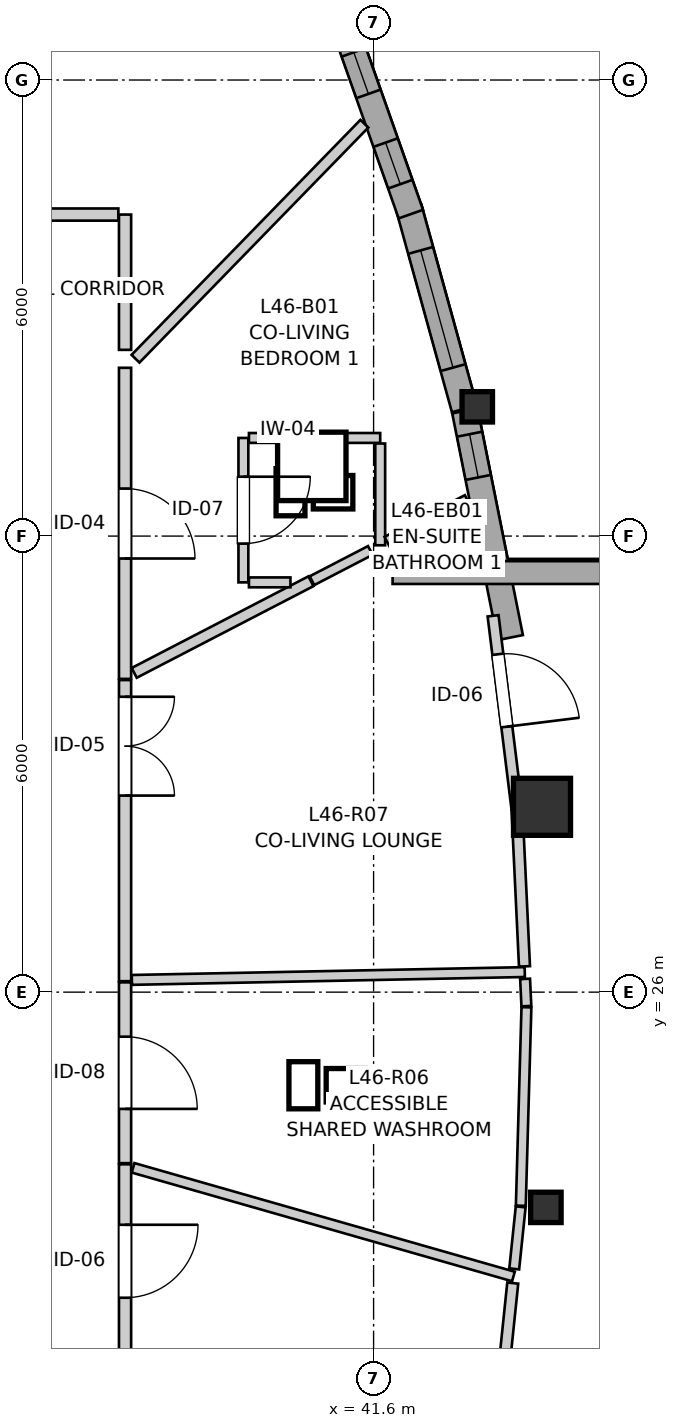
"""IFC4 building model, lengths in metres.
Left out: names, types, materials, properties, quantities, classifications, styles, units other than length and angle.
Written with IfcOpenShell. Run it as: python <this file> out.ifc"""

import sys

from ifc_helpers import new_model, si_unit, direction, frame, frame_2d, origin, origin_2d, place, context, subcontext, project, spatial, rectangle, i_section, extrude, source, transform, mapped, element, fill, save


model = new_model("IFC4")
c1 = context("Model", 3, precision=1e-05, world=origin(), true_north=direction((0.0, 1.0)))
c2 = subcontext(c1, "Body", "Model", "MODEL_VIEW")
j1 = project(units=[si_unit("LENGTHUNIT", "METRE"), si_unit("PLANEANGLEUNIT", "RADIAN")], contexts=[c1])
p1 = place(None, origin())
s1 = spatial("IfcSite", under=j1, at=p1, CompositionType="ELEMENT")
p2 = place(p1, origin())
s2 = spatial("IfcBuilding", under=s1, at=p2, CompositionType="ELEMENT")
p3 = place(p2, frame((0.0, 0.0, 155.4)))
s3 = spatial("IfcBuildingStorey", under=s2, at=p3, CompositionType="ELEMENT", Elevation=155.4)
m1 = source(origin(), c2, "Body", "SweptSolid", [
    extrude(i_section(OverallWidth=0.401, OverallDepth=0.399, WebThickness=0.023, FlangeThickness=0.036, FilletRadius=0.015, at=origin_2d()), origin(), (0.0, 0.0, 1.0), 2.935),
])
p4 = place(p3, frame((43.867, 23.168, 0.0), z_axis=(0.0, 0.0, 1.0), x_axis=(1.0, 0.0, 0.0)))
e1 = element("IfcColumn", 1, at=p4, inside=s3, PredefinedType="PILASTER", context=c2, shape_type="MappedRepresentation", body=[
    mapped(m1, transform((0.0, 0.0, 0.0), x_axis=(1.0, 0.0, 0.0), y_axis=(0.0, 1.0, 0.0), z_axis=(0.0, 0.0, 1.0), scale=1.0)),
])
m2 = source(origin(), c2, "Body", "SweptSolid", [
    extrude(rectangle(XDim=0.75, YDim=0.75, at=origin_2d()), origin(), (0.0, 0.0, 1.0), 2.935),
])
p5 = place(p3, frame((43.816, 28.438, 0.0), z_axis=(0.0, 0.0, 1.0), x_axis=(1.0, 0.0, 0.0)))
e2 = element("IfcColumn", 2, at=p5, inside=s3, PredefinedType="COLUMN", context=c2, shape_type="MappedRepresentation", body=[
    mapped(m2, transform((0.0, 0.0, 0.0), x_axis=(1.0, 0.0, 0.0), y_axis=(0.0, 1.0, 0.0), z_axis=(0.0, 0.0, 1.0), scale=1.0)),
])
p6 = place(p3, frame((42.964, 33.7, 0.0), z_axis=(0.0, 0.0, 1.0), x_axis=(1.0, 0.0, 0.0)))
e3 = element("IfcColumn", 3, at=p6, inside=s3, PredefinedType="PILASTER", context=c2, shape_type="MappedRepresentation", body=[
    mapped(m1, transform((0.0, 0.0, 0.0), x_axis=(1.0, 0.0, 0.0), y_axis=(0.0, 1.0, 0.0), z_axis=(0.0, 0.0, 1.0), scale=1.0)),
])
p7 = place(p3, frame((43.398, 30.664, 0.0), z_axis=(0.0, 0.0, 1.0), x_axis=(-0.196147002944, 0.980574501624, 0.0)))
e4 = element("IfcWall", 4, at=p7, inside=s3, PredefinedType="SOLIDWALL", context=c2, shape_type="SweptSolid", body=[
    extrude(rectangle(XDim=3.042, YDim=0.34, at=frame_2d((1.521, 0.0))), origin(), (0.0, 0.0, 1.0), 2.515),
])
p8 = place(p7, frame((2.149, 0.0, 0.82)))
e5 = element("IfcOpeningElement", 5, at=p8, cuts=e4, PredefinedType="OPENING", context=c2, shape_type="SweptSolid", body=[
    extrude(rectangle(XDim=0.58, YDim=1.35, at=frame_2d((0.29, 0.675))), frame((0.0, 0.18, 0.0), z_axis=(0.0, -1.0, 0.0), x_axis=(1.0, 0.0, 0.0)), (0.0, 0.0, 1.0), 0.36),
])
p9 = place(p3, frame((42.795, 33.674, 0.0), z_axis=(0.0, 0.0, 1.0), x_axis=(-0.266404970566, 0.963861188999, 0.0)))
e6 = element("IfcWall", 6, at=p9, inside=s3, PredefinedType="SOLIDWALL", context=c2, shape_type="SweptSolid", body=[
    extrude(rectangle(XDim=2.745, YDim=0.34, at=frame_2d((1.372, 0.0))), origin(), (0.0, 0.0, 1.0), 2.515),
])
p10 = place(p9, frame((0.562, 0.0, 0.82)))
e7 = element("IfcOpeningElement", 7, at=p10, cuts=e6, PredefinedType="OPENING", context=c2, shape_type="SweptSolid", body=[
    extrude(rectangle(XDim=1.6, YDim=1.35, at=frame_2d((0.8, 0.675))), frame((0.0, 0.18, 0.0), z_axis=(0.0, -1.0, 0.0), x_axis=(1.0, 0.0, 0.0)), (0.0, 0.0, 1.0), 0.36),
])
p11 = place(p3, frame((42.09, 36.236, 0.0), z_axis=(0.0, 0.0, 1.0), x_axis=(-0.332705243691, 0.943030869495, 0.0)))
e8 = element("IfcWall", 8, at=p11, inside=s3, PredefinedType="SOLIDWALL", context=c2, shape_type="SweptSolid", body=[
    extrude(rectangle(XDim=2.668, YDim=0.34, at=frame_2d((1.334, 0.0))), origin(), (0.0, 0.0, 1.0), 2.515),
])
p12 = place(p11, frame((0.417, 0.0, 0.82)))
e9 = element("IfcOpeningElement", 9, at=p12, cuts=e8, PredefinedType="OPENING", context=c2, shape_type="SweptSolid", body=[
    extrude(rectangle(XDim=0.58, YDim=1.35, at=frame_2d((0.29, 0.675))), frame((0.0, 0.18, 0.0), z_axis=(0.0, -1.0, 0.0), x_axis=(1.0, 0.0, 0.0)), (0.0, 0.0, 1.0), 0.36),
])
p13 = place(p11, frame((1.677, 0.0, 0.82)))
e10 = element("IfcOpeningElement", 10, at=p13, cuts=e8, PredefinedType="OPENING", context=c2, shape_type="SweptSolid", body=[
    extrude(rectangle(XDim=0.58, YDim=1.35, at=frame_2d((0.29, 0.675))), frame((0.0, 0.18, 0.0), z_axis=(0.0, -1.0, 0.0), x_axis=(1.0, 0.0, 0.0)), (0.0, 0.0, 1.0), 0.36),
])
p14 = place(p3, frame((41.85, 31.52, 0.0), z_axis=(0.0, 0.0, 1.0), x_axis=(1.0, 0.0, 0.0)))
e11 = element("IfcWall", 11, at=p14, inside=s3, PredefinedType="SOLIDWALL", context=c2, shape_type="SweptSolid", body=[
    extrude(rectangle(XDim=17.423, YDim=0.3, at=frame_2d((8.711, 0.0))), origin(), (0.0, 0.0, 1.0), 2.115),
])
p15 = place(p3, frame((38.33, 34.214, 0.0), z_axis=(0.0, 0.0, 1.0), x_axis=(0.0, -1.0, 0.0)))
e12 = element("IfcWall", 12, at=p15, inside=s3, PredefinedType="PARTITIONING", context=c2, shape_type="SweptSolid", body=[
    extrude(rectangle(XDim=4.093, YDim=0.16, at=frame_2d((2.046, 0.0))), origin(), (0.0, 0.0, 1.0), 2.935),
])
p16 = place(p15, frame((1.589, 0.0, 0.0)))
e13 = element("IfcOpeningElement", 13, at=p16, cuts=e12, PredefinedType="OPENING", context=c2, shape_type="SweptSolid", body=[
    extrude(rectangle(XDim=0.92, YDim=2.1, at=frame_2d((0.46, 1.05))), frame((0.0, 0.09, 0.0), z_axis=(0.0, -1.0, 0.0), x_axis=(1.0, 0.0, 0.0)), (0.0, 0.0, 1.0), 0.18),
])
p17 = place(p3, frame((38.33, 30.106, 0.0), z_axis=(0.0, 0.0, 1.0), x_axis=(0.0, -1.0, 0.0)))
e14 = element("IfcWall", 14, at=p17, inside=s3, PredefinedType="PARTITIONING", context=c2, shape_type="SweptSolid", body=[
    extrude(rectangle(XDim=3.962, YDim=0.16, at=frame_2d((1.981, 0.0))), origin(), (0.0, 0.0, 1.0), 2.935),
])
p18 = place(p17, frame((0.22, 0.0, 0.0)))
e15 = element("IfcOpeningElement", 15, at=p18, cuts=e14, PredefinedType="OPENING", context=c2, shape_type="SweptSolid", body=[
    extrude(rectangle(XDim=1.3, YDim=2.1, at=frame_2d((0.65, 1.05))), frame((0.0, 0.09, 0.0), z_axis=(0.0, -1.0, 0.0), x_axis=(1.0, 0.0, 0.0)), (0.0, 0.0, 1.0), 0.18),
])
p19 = place(p3, frame((43.172, 30.951, 0.0), z_axis=(0.0, 0.0, 1.0), x_axis=(0.122990311665, -0.99240787141, 0.0)))
e16 = element("IfcWall", 16, at=p19, inside=s3, PredefinedType="PARTITIONING", context=c2, shape_type="SweptSolid", body=[
    extrude(rectangle(XDim=2.561, YDim=0.145, at=frame_2d((1.28, 0.0))), origin(), (0.0, 0.0, 1.0), 2.503),
])
p20 = place(p19, frame((0.51, 0.0, 0.0)))
e17 = element("IfcOpeningElement", 17, at=p20, cuts=e16, PredefinedType="OPENING", context=c2, shape_type="SweptSolid", body=[
    extrude(rectangle(XDim=0.96, YDim=2.1, at=frame_2d((0.48, 1.05))), frame((0.0, 0.083, 0.0), z_axis=(0.0, -1.0, 0.0), x_axis=(1.0, 0.0, 0.0)), (0.0, 0.0, 1.0), 0.165),
])
p21 = place(p3, frame((38.33, 23.735, 0.0), z_axis=(0.0, 0.0, 1.0), x_axis=(0.0, -1.0, 0.0)))
e18 = element("IfcWall", 18, at=p21, inside=s3, PredefinedType="PARTITIONING", context=c2, shape_type="SweptSolid", body=[
    extrude(rectangle(XDim=2.535, YDim=0.16, at=frame_2d((1.268, 0.0))), origin(), (0.0, 0.0, 1.0), 2.935),
])
p22 = place(p21, frame((0.795, 0.0, 0.0)))
e19 = element("IfcOpeningElement", 19, at=p22, cuts=e18, PredefinedType="OPENING", context=c2, shape_type="SweptSolid", body=[
    extrude(rectangle(XDim=0.96, YDim=2.1, at=frame_2d((0.48, 1.05))), frame((0.0, 0.09, 0.0), z_axis=(0.0, -1.0, 0.0), x_axis=(1.0, 0.0, 0.0)), (0.0, 0.0, 1.0), 0.18),
])
p23 = place(p3, frame((38.33, 26.129, 0.0), z_axis=(0.0, 0.0, 1.0), x_axis=(0.0, -1.0, 0.0)))
e20 = element("IfcWall", 20, at=p23, inside=s3, PredefinedType="PARTITIONING", context=c2, shape_type="SweptSolid", body=[
    extrude(rectangle(XDim=2.379, YDim=0.16, at=frame_2d((1.189, 0.0))), origin(), (0.0, 0.0, 1.0), 2.935),
])
p24 = place(p23, frame((0.715, 0.0, 0.0)))
e21 = element("IfcOpeningElement", 21, at=p24, cuts=e20, PredefinedType="OPENING", context=c2, shape_type="SweptSolid", body=[
    extrude(rectangle(XDim=0.95, YDim=2.1, at=frame_2d((0.475, 1.05))), frame((0.0, 0.09, 0.0), z_axis=(0.0, -1.0, 0.0), x_axis=(1.0, 0.0, 0.0)), (0.0, 0.0, 1.0), 0.18),
])
p25 = place(p3, frame((39.887, 33.291, 0.0), z_axis=(0.0, 0.0, 1.0), x_axis=(0.0, -1.0, 0.0)))
e22 = element("IfcWall", 22, at=p25, inside=s3, PredefinedType="PARTITIONING", context=c2, shape_type="SweptSolid", body=[
    extrude(rectangle(XDim=1.9, YDim=0.13, at=frame_2d((0.95, 0.0))), origin(), (0.0, 0.0, 1.0), 2.935),
])
p26 = place(p25, frame((0.51, 0.0, 0.0)))
e23 = element("IfcOpeningElement", 23, at=p26, cuts=e22, PredefinedType="OPENING", context=c2, shape_type="SweptSolid", body=[
    extrude(rectangle(XDim=0.88, YDim=2.05, at=frame_2d((0.44, 1.025))), frame((0.0, 0.075, 0.0), z_axis=(0.0, -1.0, 0.0), x_axis=(1.0, 0.0, 0.0)), (0.0, 0.0, 1.0), 0.15),
])
p27 = place(p3, frame((38.436, 23.689, 0.0), z_axis=(0.0, 0.0, 1.0), x_axis=(0.961531027854, -0.274696345942, 0.0)))
e24 = element("IfcWall", 24, at=p27, inside=s3, PredefinedType="PARTITIONING", context=c2, shape_type="SweptSolid", body=[
    extrude(rectangle(XDim=5.205, YDim=0.13, at=frame_2d((2.602, 0.0))), origin(), (0.0, 0.0, 1.0), 2.935),
])
p28 = place(p3, frame((38.419, 26.161, 0.0), z_axis=(0.0, 0.0, 1.0), x_axis=(0.999801492135, 0.019924264719, 0.0)))
e25 = element("IfcWall", 25, at=p28, inside=s3, PredefinedType="PARTITIONING", context=c2, shape_type="SweptSolid", body=[
    extrude(rectangle(XDim=5.171, YDim=0.13, at=frame_2d((2.585, 0.0))), origin(), (0.0, 0.0, 1.0), 2.935),
])
p29 = place(p3, frame((38.468, 34.333, 0.0), z_axis=(0.0, 0.0, 1.0), x_axis=(0.697683159601, 0.71640645503, 0.0)))
e26 = element("IfcWall", 26, at=p29, inside=s3, PredefinedType="PARTITIONING", context=c2, shape_type="SweptSolid", body=[
    extrude(rectangle(XDim=4.316, YDim=0.145, at=frame_2d((2.158, 0.0))), origin(), (0.0, 0.0, 1.0), 2.935),
])
p30 = place(p3, frame((38.45, 30.2, 0.0), z_axis=(0.0, 0.0, 1.0), x_axis=(0.887788385545, 0.460251868537, 0.0)))
e27 = element("IfcWall", 27, at=p30, inside=s3, PredefinedType="PARTITIONING", context=c2, shape_type="SweptSolid", body=[
    extrude(rectangle(XDim=2.619, YDim=0.145, at=frame_2d((1.31, 0.0))), origin(), (0.0, 0.0, 1.0), 2.935),
])
p31 = place(p3, frame((43.537, 23.19, 0.0), z_axis=(0.0, 0.0, 1.0), x_axis=(0.028319632762, 0.999598918767, 0.0)))
e28 = element("IfcWall", 28, at=p31, inside=s3, PredefinedType="PARTITIONING", context=c2, shape_type="SweptSolid", body=[
    extrude(rectangle(XDim=2.612, YDim=0.13, at=frame_2d((1.306, 0.0))), origin(), (0.0, 0.0, 1.0), 2.503),
])
p32 = place(p3, frame((43.488, 28.395, 0.0), z_axis=(0.0, 0.0, 1.0), x_axis=(0.047441179451, -0.998874033346, 0.0)))
e29 = element("IfcWall", 29, at=p32, inside=s3, PredefinedType="PARTITIONING", context=c2, shape_type="SweptSolid", body=[
    extrude(rectangle(XDim=2.058, YDim=0.145, at=frame_2d((1.029, 0.0))), origin(), (0.0, 0.0, 1.0), 2.503),
])
p33 = place(p3, frame((39.96, 33.291, 0.0), z_axis=(0.0, 0.0, 1.0), x_axis=(1.0, 0.0, 0.0)))
e30 = element("IfcWall", 30, at=p33, inside=s3, PredefinedType="PARTITIONING", context=c2, shape_type="SweptSolid", body=[
    extrude(rectangle(XDim=1.727, YDim=0.13, at=frame_2d((0.864, 0.0))), origin(), (0.0, 0.0, 1.0), 2.935),
])
p34 = place(p3, frame((38.33, 34.45, 0.0), z_axis=(0.0, 0.0, 1.0), x_axis=(0.0, 1.0, 0.0)))
e31 = element("IfcWall", 31, at=p34, inside=s3, PredefinedType="PARTITIONING", context=c2, shape_type="SweptSolid", body=[
    extrude(rectangle(XDim=1.78, YDim=0.16, at=frame_2d((0.89, 0.0))), origin(), (0.0, 0.0, 1.0), 2.935),
])
p35 = place(p3, frame((36.565, 36.23, 0.0), z_axis=(0.0, 0.0, 1.0), x_axis=(1.0, 0.0, 0.0)))
e32 = element("IfcWall", 32, at=p35, inside=s3, PredefinedType="PARTITIONING", context=c2, shape_type="SweptSolid", body=[
    extrude(rectangle(XDim=1.677, YDim=0.16, at=frame_2d((0.838, 0.0))), origin(), (0.0, 0.0, 1.0), 2.935),
])
p36 = place(p3, frame((43.273, 20.646, 0.0), z_axis=(0.0, 0.0, 1.0), x_axis=(0.103045636414, 0.99467662927, 0.0)))
e33 = element("IfcWall", 33, at=p36, inside=s3, PredefinedType="PARTITIONING", context=c2, shape_type="SweptSolid", body=[
    extrude(rectangle(XDim=1.535, YDim=0.145, at=frame_2d((0.768, 0.0))), origin(), (0.0, 0.0, 1.0), 2.503),
])
p37 = place(p3, frame((41.687, 31.879, 0.0), z_axis=(0.0, 0.0, 1.0), x_axis=(0.0, 1.0, 0.0)))
e34 = element("IfcWall", 34, at=p37, inside=s3, PredefinedType="PARTITIONING", context=c2, shape_type="SweptSolid", body=[
    extrude(rectangle(XDim=1.339, YDim=0.13, at=frame_2d((0.669, 0.0))), origin(), (0.0, 0.0, 1.0), 2.935),
])
p38 = place(p3, frame((41.778, 31.926, 0.0), z_axis=(0.0, 0.0, 1.0), x_axis=(0.887683122967, 0.460454854681, 0.0)))
e35 = element("IfcWall", 35, at=p38, inside=s3, PredefinedType="PARTITIONING", context=c2, shape_type="SweptSolid", body=[
    extrude(rectangle(XDim=1.19, YDim=0.145, at=frame_2d((0.595, 0.0))), origin(), (0.0, 0.0, 1.0), 2.935),
])
p39 = place(p3, frame((40.789, 31.413, 0.0), z_axis=(0.0, 0.0, 1.0), x_axis=(0.887895541879, 0.460045113779, 0.0)))
e36 = element("IfcWall", 36, at=p39, inside=s3, PredefinedType="PARTITIONING", context=c2, shape_type="SweptSolid", body=[
    extrude(rectangle(XDim=0.865, YDim=0.13, at=frame_2d((0.432, 0.0))), origin(), (0.0, 0.0, 1.0), 2.935),
])
p40 = place(p3, frame((43.45, 22.359, 0.0), z_axis=(0.0, 0.0, 1.0), x_axis=(0.103538633142, 0.994625432737, 0.0)))
e37 = element("IfcWall", 37, at=p40, inside=s3, PredefinedType="PARTITIONING", context=c2, shape_type="SweptSolid", body=[
    extrude(rectangle(XDim=0.821, YDim=0.13, at=frame_2d((0.41, 0.0))), origin(), (0.0, 0.0, 1.0), 2.503),
])
p41 = place(p3, frame((39.96, 31.391, 0.0), z_axis=(0.0, 0.0, 1.0), x_axis=(1.0, 0.0, 0.0)))
e38 = element("IfcWall", 38, at=p41, inside=s3, PredefinedType="PARTITIONING", context=c2, shape_type="SweptSolid", body=[
    extrude(rectangle(XDim=0.546, YDim=0.13, at=frame_2d((0.273, 0.0))), origin(), (0.0, 0.0, 1.0), 2.103),
])
p42 = place(p3, frame((43.593, 26.174, 0.0), z_axis=(0.0, 0.0, 1.0), x_axis=(0.04762980516, -0.998865056782, 0.0)))
e39 = element("IfcWall", 39, at=p42, inside=s3, PredefinedType="PARTITIONING", context=c2, shape_type="SweptSolid", body=[
    extrude(rectangle(XDim=0.359, YDim=0.13, at=frame_2d((0.179, 0.0))), origin(), (0.0, 0.0, 1.0), 2.503),
])
m3 = source(origin(), c2, "Body", "SweptSolid", [
    extrude(rectangle(XDim=0.58, YDim=1.35, at=frame_2d((0.29, 0.675))), frame((0.0, 0.03, 0.0), z_axis=(0.0, -1.0, 0.0), x_axis=(1.0, 0.0, 0.0)), (0.0, 0.0, 1.0), 0.06),
])
p43 = place(p8, origin())
e40 = element("IfcWindow", 40, at=p43, inside=s3, PartitioningType="SINGLE_PANEL", PredefinedType="WINDOW", context=c2, shape_type="MappedRepresentation", body=[
    mapped(m3, transform((0.0, 0.0, 0.0), x_axis=(1.0, 0.0, 0.0), y_axis=(0.0, 1.0, 0.0), z_axis=(0.0, 0.0, 1.0), scale=1.0)),
])
fill(e5, e40)
m4 = source(origin(), c2, "Body", "SweptSolid", [
    extrude(rectangle(XDim=1.6, YDim=1.35, at=frame_2d((0.8, 0.675))), frame((0.0, 0.03, 0.0), z_axis=(0.0, -1.0, 0.0), x_axis=(1.0, 0.0, 0.0)), (0.0, 0.0, 1.0), 0.06),
])
p44 = place(p10, origin())
e41 = element("IfcWindow", 41, at=p44, inside=s3, PartitioningType="SINGLE_PANEL", PredefinedType="WINDOW", context=c2, shape_type="MappedRepresentation", body=[
    mapped(m4, transform((0.0, 0.0, 0.0), x_axis=(1.0, 0.0, 0.0), y_axis=(0.0, 1.0, 0.0), z_axis=(0.0, 0.0, 1.0), scale=1.0)),
])
fill(e7, e41)
p45 = place(p12, origin())
e42 = element("IfcWindow", 42, at=p45, inside=s3, PartitioningType="SINGLE_PANEL", PredefinedType="WINDOW", context=c2, shape_type="MappedRepresentation", body=[
    mapped(m3, transform((0.0, 0.0, 0.0), x_axis=(1.0, 0.0, 0.0), y_axis=(0.0, 1.0, 0.0), z_axis=(0.0, 0.0, 1.0), scale=1.0)),
])
fill(e9, e42)
p46 = place(p13, origin())
e43 = element("IfcWindow", 43, at=p46, inside=s3, PartitioningType="SINGLE_PANEL", PredefinedType="WINDOW", context=c2, shape_type="MappedRepresentation", body=[
    mapped(m3, transform((0.0, 0.0, 0.0), x_axis=(1.0, 0.0, 0.0), y_axis=(0.0, 1.0, 0.0), z_axis=(0.0, 0.0, 1.0), scale=1.0)),
])
fill(e10, e43)
m5 = source(origin(), c2, "Body", "SweptSolid", [
    extrude(rectangle(XDim=0.92, YDim=2.1, at=frame_2d((0.46, 1.05))), frame((0.0, 0.025, 0.0), z_axis=(0.0, -1.0, 0.0), x_axis=(1.0, 0.0, 0.0)), (0.0, 0.0, 1.0), 0.05),
])
p47 = place(p16, origin())
e44 = element("IfcDoor", 44, at=p47, inside=s3, OperationType="SINGLE_SWING_RIGHT", PredefinedType="DOOR", context=c2, shape_type="MappedRepresentation", body=[
    mapped(m5, transform((0.0, 0.0, 0.0), x_axis=(1.0, 0.0, 0.0), y_axis=(0.0, 1.0, 0.0), z_axis=(0.0, 0.0, 1.0), scale=1.0)),
])
fill(e13, e44)
m6 = source(origin(), c2, "Body", "SweptSolid", [
    extrude(rectangle(XDim=1.3, YDim=2.1, at=frame_2d((0.65, 1.05))), frame((0.0, 0.025, 0.0), z_axis=(0.0, -1.0, 0.0), x_axis=(1.0, 0.0, 0.0)), (0.0, 0.0, 1.0), 0.05),
])
p48 = place(p18, origin())
e45 = element("IfcDoor", 45, at=p48, inside=s3, OperationType="DOUBLE_DOOR_SINGLE_SWING", PredefinedType="DOOR", context=c2, shape_type="MappedRepresentation", body=[
    mapped(m6, transform((0.0, 0.0, 0.0), x_axis=(1.0, 0.0, 0.0), y_axis=(0.0, 1.0, 0.0), z_axis=(0.0, 0.0, 1.0), scale=1.0)),
])
fill(e15, e45)
m7 = source(origin(), c2, "Body", "SweptSolid", [
    extrude(rectangle(XDim=0.96, YDim=2.1, at=frame_2d((0.48, 1.05))), frame((0.0, 0.025, 0.0), z_axis=(0.0, -1.0, 0.0), x_axis=(1.0, 0.0, 0.0)), (0.0, 0.0, 1.0), 0.05),
])
p49 = place(p20, origin())
e46 = element("IfcDoor", 46, at=p49, inside=s3, OperationType="SINGLE_SWING_RIGHT", PredefinedType="DOOR", context=c2, shape_type="MappedRepresentation", body=[
    mapped(m7, transform((0.0, 0.0, 0.0), x_axis=(1.0, 0.0, 0.0), y_axis=(0.0, 1.0, 0.0), z_axis=(0.0, 0.0, 1.0), scale=1.0)),
])
fill(e17, e46)
p50 = place(p22, origin())
e47 = element("IfcDoor", 47, at=p50, inside=s3, OperationType="SINGLE_SWING_LEFT", PredefinedType="DOOR", context=c2, shape_type="MappedRepresentation", body=[
    mapped(m7, transform((0.0, 0.0, 0.0), x_axis=(1.0, 0.0, 0.0), y_axis=(0.0, 1.0, 0.0), z_axis=(0.0, 0.0, 1.0), scale=1.0)),
])
fill(e19, e47)
m8 = source(origin(), c2, "Body", "SweptSolid", [
    extrude(rectangle(XDim=0.95, YDim=2.1, at=frame_2d((0.475, 1.05))), frame((0.0, 0.025, 0.0), z_axis=(0.0, -1.0, 0.0), x_axis=(1.0, 0.0, 0.0)), (0.0, 0.0, 1.0), 0.05),
])
p51 = place(p24, origin())
e48 = element("IfcDoor", 48, at=p51, inside=s3, OperationType="SINGLE_SWING_RIGHT", PredefinedType="DOOR", context=c2, shape_type="MappedRepresentation", body=[
    mapped(m8, transform((0.0, 0.0, 0.0), x_axis=(1.0, 0.0, 0.0), y_axis=(0.0, 1.0, 0.0), z_axis=(0.0, 0.0, 1.0), scale=1.0)),
])
fill(e21, e48)
m9 = source(origin(), c2, "Body", "SweptSolid", [
    extrude(rectangle(XDim=0.88, YDim=2.05, at=frame_2d((0.44, 1.025))), frame((0.0, 0.025, 0.0), z_axis=(0.0, -1.0, 0.0), x_axis=(1.0, 0.0, 0.0)), (0.0, 0.0, 1.0), 0.05),
])
p52 = place(p26, origin())
e49 = element("IfcDoor", 49, at=p52, inside=s3, OperationType="SINGLE_SWING_LEFT", PredefinedType="DOOR", context=c2, shape_type="MappedRepresentation", body=[
    mapped(m9, transform((0.0, 0.0, 0.0), x_axis=(1.0, 0.0, 0.0), y_axis=(0.0, 1.0, 0.0), z_axis=(0.0, 0.0, 1.0), scale=1.0)),
])
fill(e23, e49)
save(model, sys.argv[1])
